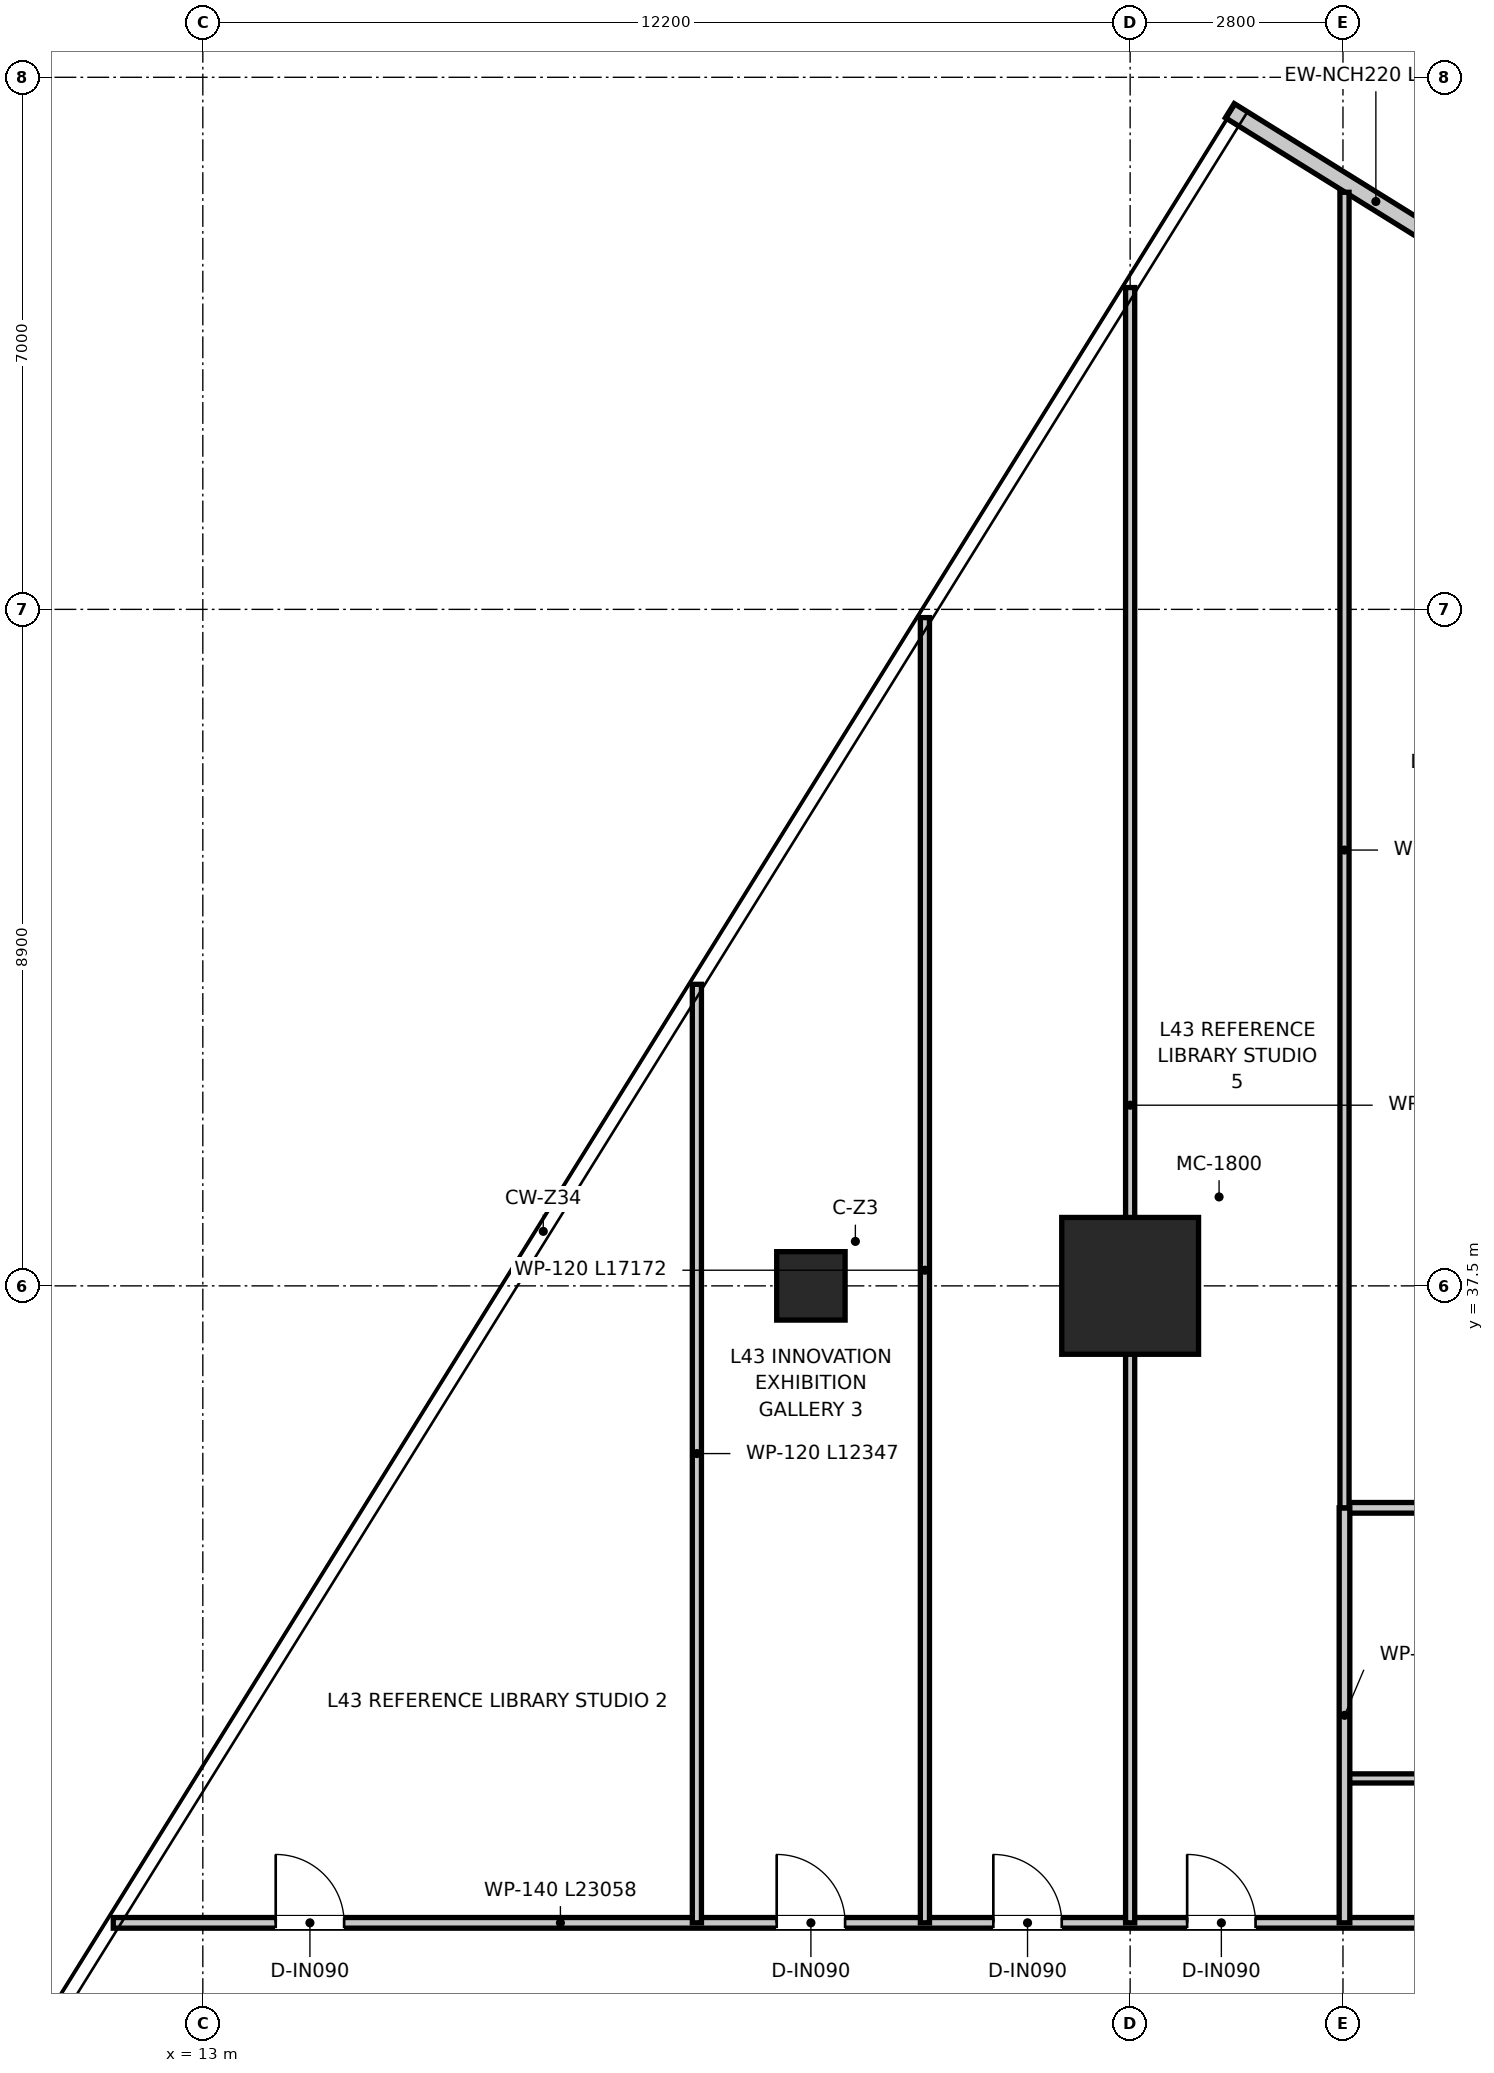
"""IFC4 building model, lengths in metres.
Left out: names, types, materials, properties, quantities, classifications, styles, units other than length and angle.
Written with IfcOpenShell. Run it as: python <this file> out.ifc"""

import sys

from ifc_helpers import new_model, si_unit, direction, frame, frame_2d, origin, origin_2d, place, context, subcontext, project, spatial, rectangle, extrude, source, transform, mapped, element, fill, save


model = new_model("IFC4")
c1 = context("Model", 3, precision=1e-05, world=origin(), true_north=direction((0.0, 1.0)))
c2 = subcontext(c1, "Body", "Model", "MODEL_VIEW")
j1 = project(units=[si_unit("LENGTHUNIT", "METRE"), si_unit("PLANEANGLEUNIT", "RADIAN")], contexts=[c1])
p1 = place(None, origin())
s1 = spatial("IfcSite", under=j1, at=p1, CompositionType="ELEMENT")
p2 = place(p1, origin())
s2 = spatial("IfcBuilding", under=s1, at=p2, CompositionType="ELEMENT")
p3 = place(p2, frame((0.0, 0.0, 177.8)))
s3 = spatial("IfcBuildingStorey", under=s2, at=p3, CompositionType="ELEMENT", Elevation=177.8)
m1 = source(origin(), c2, "Body", "SweptSolid", [
    extrude(rectangle(XDim=1.8, YDim=1.8, at=origin_2d()), origin(), (0.0, 0.0, 1.0), 3.95),
])
p4 = place(p3, frame((25.2, 37.5, 0.0), z_axis=(0.0, 0.0, 1.0), x_axis=(1.0, 0.0, 0.0)))
e1 = element("IfcColumn", 1, at=p4, inside=s3, PredefinedType="USERDEFINED", context=c2, shape_type="MappedRepresentation", body=[
    mapped(m1, transform((0.0, 0.0, 0.0), x_axis=(1.0, 0.0, 0.0), y_axis=(0.0, 1.0, 0.0), z_axis=(0.0, 0.0, 1.0), scale=1.0)),
])
m2 = source(origin(), c2, "Body", "SweptSolid", [
    extrude(rectangle(XDim=0.9, YDim=0.9, at=origin_2d()), origin(), (0.0, 0.0, 1.0), 3.95),
])
p5 = place(p3, frame((21.0, 37.5, 0.0), z_axis=(0.0, 0.0, 1.0), x_axis=(1.0, 0.0, 0.0)))
e2 = element("IfcColumn", 2, at=p5, inside=s3, PredefinedType="COLUMN", context=c2, shape_type="MappedRepresentation", body=[
    mapped(m2, transform((0.0, 0.0, 0.0), x_axis=(1.0, 0.0, 0.0), y_axis=(0.0, 1.0, 0.0), z_axis=(0.0, 0.0, 1.0), scale=1.0)),
])
p6 = place(p3, frame((30.354, 50.571, 0.0), z_axis=(0.0, 0.0, 1.0), x_axis=(-0.849196398465, 0.528077150456, 0.0)))
e3 = element("IfcWall", 3, at=p6, inside=s3, PredefinedType="ELEMENTEDWALL", context=c2, shape_type="SweptSolid", body=[
    extrude(rectangle(XDim=4.525, YDim=0.22, at=frame_2d((2.263, 0.0))), origin(), (0.0, 0.0, 1.0), 3.67),
])
p7 = place(p3, frame((11.822, 29.12, 0.0), z_axis=(0.0, 0.0, 1.0), x_axis=(1.0, 0.0, 0.0)))
e4 = element("IfcWall", 4, at=p7, inside=s3, PredefinedType="PARTITIONING", context=c2, shape_type="SweptSolid", body=[
    extrude(rectangle(XDim=23.058, YDim=0.14, at=frame_2d((11.529, 0.0))), origin(), (0.0, 0.0, 1.0), 3.03),
])
p8 = place(p7, frame((19.128, 0.0, 0.0)))
e5 = element("IfcOpeningElement", 5, at=p8, cuts=e4, PredefinedType="OPENING", context=c2, shape_type="SweptSolid", body=[
    extrude(rectangle(XDim=0.9, YDim=2.1, at=frame_2d((0.45, 1.05))), frame((0.0, 0.08, 0.0), z_axis=(0.0, -1.0, 0.0), x_axis=(1.0, 0.0, 0.0)), (0.0, 0.0, 1.0), 0.16),
])
p9 = place(p7, frame((2.137, 0.0, 0.0)))
e6 = element("IfcOpeningElement", 6, at=p9, cuts=e4, PredefinedType="OPENING", context=c2, shape_type="SweptSolid", body=[
    extrude(rectangle(XDim=0.9, YDim=2.1, at=frame_2d((0.45, 1.05))), frame((0.0, 0.08, 0.0), z_axis=(0.0, -1.0, 0.0), x_axis=(1.0, 0.0, 0.0)), (0.0, 0.0, 1.0), 0.16),
])
p10 = place(p7, frame((8.728, 0.0, 0.0)))
e7 = element("IfcOpeningElement", 7, at=p10, cuts=e4, PredefinedType="OPENING", context=c2, shape_type="SweptSolid", body=[
    extrude(rectangle(XDim=0.9, YDim=2.1, at=frame_2d((0.45, 1.05))), frame((0.0, 0.08, 0.0), z_axis=(0.0, -1.0, 0.0), x_axis=(1.0, 0.0, 0.0)), (0.0, 0.0, 1.0), 0.16),
])
p11 = place(p7, frame((11.578, 0.0, 0.0)))
e8 = element("IfcOpeningElement", 8, at=p11, cuts=e4, PredefinedType="OPENING", context=c2, shape_type="SweptSolid", body=[
    extrude(rectangle(XDim=0.9, YDim=2.1, at=frame_2d((0.45, 1.05))), frame((0.0, 0.08, 0.0), z_axis=(0.0, -1.0, 0.0), x_axis=(1.0, 0.0, 0.0)), (0.0, 0.0, 1.0), 0.16),
])
p12 = place(p7, frame((14.128, 0.0, 0.0)))
e9 = element("IfcOpeningElement", 9, at=p12, cuts=e4, PredefinedType="OPENING", context=c2, shape_type="SweptSolid", body=[
    extrude(rectangle(XDim=0.9, YDim=2.1, at=frame_2d((0.45, 1.05))), frame((0.0, 0.08, 0.0), z_axis=(0.0, -1.0, 0.0), x_axis=(1.0, 0.0, 0.0)), (0.0, 0.0, 1.0), 0.16),
])
p13 = place(p3, frame((28.02, 31.02, 0.0), z_axis=(0.0, 0.0, 1.0), x_axis=(1.0, 0.0, 0.0)))
e10 = element("IfcWall", 10, at=p13, inside=s3, PredefinedType="PARTITIONING", context=c2, shape_type="SweptSolid", body=[
    extrude(rectangle(XDim=6.86, YDim=0.12, at=frame_2d((3.43, 0.0))), origin(), (0.0, 0.0, 1.0), 3.08),
])
p14 = place(p3, frame((28.02, 34.58, 0.0), z_axis=(0.0, 0.0, 1.0), x_axis=(1.0, 0.0, 0.0)))
e11 = element("IfcWall", 11, at=p14, inside=s3, PredefinedType="PARTITIONING", context=c2, shape_type="SweptSolid", body=[
    extrude(rectangle(XDim=6.86, YDim=0.14, at=frame_2d((3.43, 0.0))), origin(), (0.0, 0.0, 1.0), 3.08),
])
p15 = place(p3, frame((28.02, 29.12, 0.0), z_axis=(0.0, 0.0, 1.0), x_axis=(0.0, 1.0, 0.0)))
e12 = element("IfcWall", 12, at=p15, inside=s3, PredefinedType="PARTITIONING", context=c2, shape_type="SweptSolid", body=[
    extrude(rectangle(XDim=5.46, YDim=0.14, at=frame_2d((2.73, 0.0))), origin(), (0.0, 0.0, 1.0), 3.31),
])
p16 = place(p3, frame((19.5, 29.12, 0.0), z_axis=(0.0, 0.0, 1.0), x_axis=(0.0, 1.0, 0.0)))
e13 = element("IfcWall", 13, at=p16, inside=s3, PredefinedType="PARTITIONING", context=c2, shape_type="SweptSolid", body=[
    extrude(rectangle(XDim=12.347, YDim=0.12, at=frame_2d((6.174, 0.0))), origin(), (0.0, 0.0, 1.0), 3.67),
])
p17 = place(p3, frame((22.5, 29.12, 0.0), z_axis=(0.0, 0.0, 1.0), x_axis=(0.0, 1.0, 0.0)))
e14 = element("IfcWall", 14, at=p17, inside=s3, PredefinedType="PARTITIONING", context=c2, shape_type="SweptSolid", body=[
    extrude(rectangle(XDim=17.172, YDim=0.12, at=frame_2d((8.586, 0.0))), origin(), (0.0, 0.0, 1.0), 3.08),
])
p18 = place(p3, frame((25.2, 29.12, 0.0), z_axis=(0.0, 0.0, 1.0), x_axis=(0.0, 1.0, 0.0)))
e15 = element("IfcWall", 15, at=p18, inside=s3, PredefinedType="PARTITIONING", context=c2, shape_type="SweptSolid", body=[
    extrude(rectangle(XDim=21.514, YDim=0.12, at=frame_2d((10.757, 0.0))), origin(), (0.0, 0.0, 1.0), 3.03),
])
p19 = place(p3, frame((28.02, 34.58, 0.0), z_axis=(0.0, 0.0, 1.0), x_axis=(0.0, 1.0, 0.0)))
e16 = element("IfcWall", 16, at=p19, inside=s3, PredefinedType="PARTITIONING", context=c2, shape_type="SweptSolid", body=[
    extrude(rectangle(XDim=17.307, YDim=0.12, at=frame_2d((8.654, 0.0))), origin(), (0.0, 0.0, 1.0), 3.03),
])
p20 = place(p9, origin())
e17 = element("IfcDoor", 17, at=p20, inside=s3, OperationType="SINGLE_SWING_LEFT", PredefinedType="DOOR", context=c2, shape_type="SweptSolid", body=[
    extrude(rectangle(XDim=0.9, YDim=2.1, at=frame_2d((0.45, 1.05))), frame((0.0, 0.025, 0.0), z_axis=(0.0, -1.0, 0.0), x_axis=(1.0, 0.0, 0.0)), (0.0, 0.0, 1.0), 0.05),
])
fill(e6, e17)
p21 = place(p10, origin())
e18 = element("IfcDoor", 18, at=p21, inside=s3, OperationType="SINGLE_SWING_LEFT", PredefinedType="DOOR", context=c2, shape_type="SweptSolid", body=[
    extrude(rectangle(XDim=0.9, YDim=2.1, at=frame_2d((0.45, 1.05))), frame((0.0, 0.025, 0.0), z_axis=(0.0, -1.0, 0.0), x_axis=(1.0, 0.0, 0.0)), (0.0, 0.0, 1.0), 0.05),
])
fill(e7, e18)
p22 = place(p11, origin())
e19 = element("IfcDoor", 19, at=p22, inside=s3, OperationType="SINGLE_SWING_LEFT", PredefinedType="DOOR", context=c2, shape_type="SweptSolid", body=[
    extrude(rectangle(XDim=0.9, YDim=2.1, at=frame_2d((0.45, 1.05))), frame((0.0, 0.025, 0.0), z_axis=(0.0, -1.0, 0.0), x_axis=(1.0, 0.0, 0.0)), (0.0, 0.0, 1.0), 0.05),
])
fill(e8, e19)
p23 = place(p12, origin())
e20 = element("IfcDoor", 20, at=p23, inside=s3, OperationType="SINGLE_SWING_LEFT", PredefinedType="DOOR", context=c2, shape_type="SweptSolid", body=[
    extrude(rectangle(XDim=0.9, YDim=2.1, at=frame_2d((0.45, 1.05))), frame((0.0, 0.025, 0.0), z_axis=(0.0, -1.0, 0.0), x_axis=(1.0, 0.0, 0.0)), (0.0, 0.0, 1.0), 0.05),
])
fill(e9, e20)
save(model, sys.argv[1])
